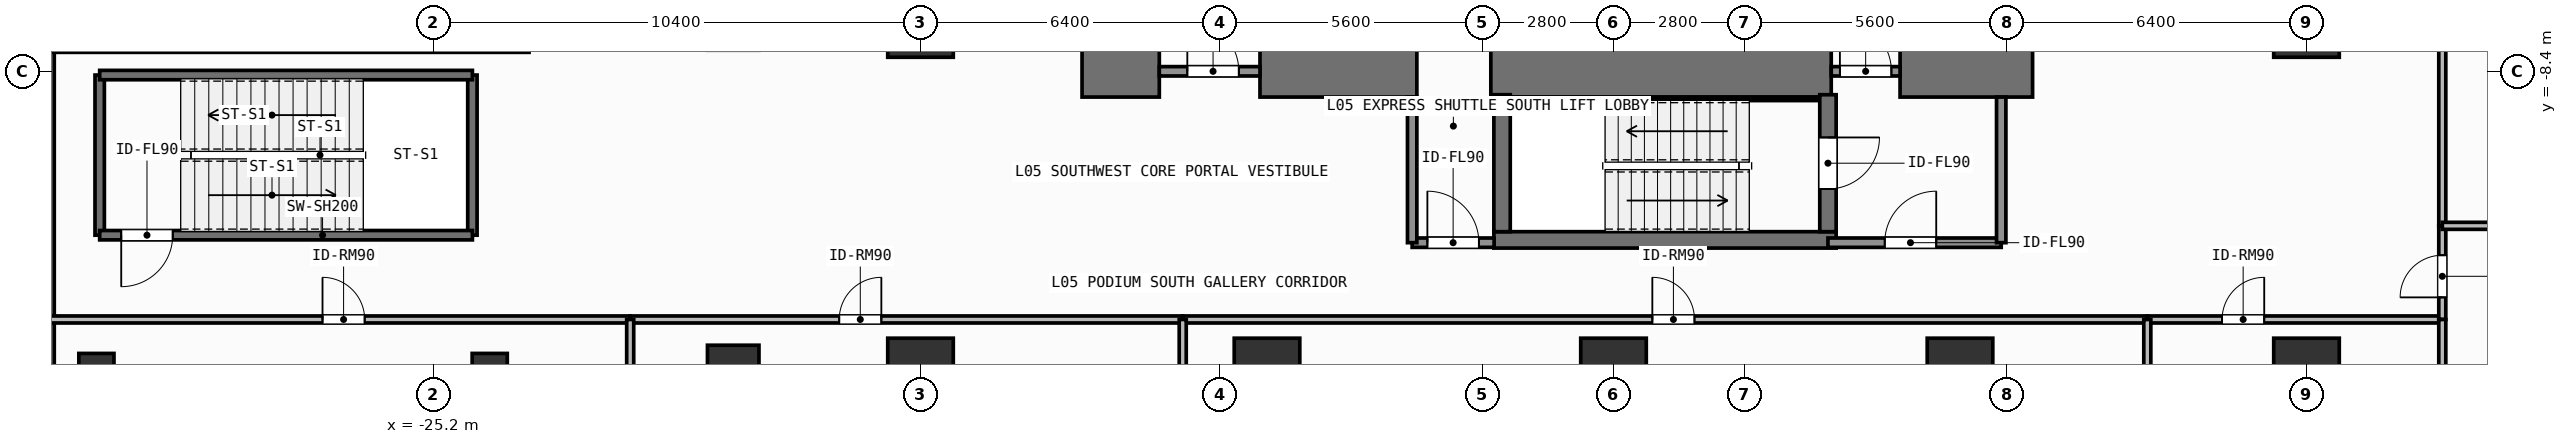
"""IFC4 building model, lengths in metres.
Left out: names, types, materials, properties, quantities, classifications, styles, units other than length and angle.
Written with IfcOpenShell. Run it as: python <this file> out.ifc"""

import sys

from ifc_helpers import new_model, si_unit, direction, frame, frame_2d, origin, origin_2d, place, context, subcontext, project, spatial, rectangle, extrude, element, fill, save


model = new_model("IFC4")
c1 = context("Model", 3, precision=1e-05, world=origin(), true_north=direction((0.0, 1.0)))
c2 = subcontext(c1, "Body", "Model", "MODEL_VIEW")
j1 = project(units=[si_unit("LENGTHUNIT", "METRE"), si_unit("PLANEANGLEUNIT", "RADIAN")], contexts=[c1])
p1 = place(None, origin())
s1 = spatial("IfcSite", under=j1, at=p1, CompositionType="ELEMENT")
p2 = place(p1, origin())
s2 = spatial("IfcBuilding", under=s1, at=p2, CompositionType="ELEMENT")
p3 = place(p2, frame((0.0, 0.0, 17.4)))
s3 = spatial("IfcBuildingStorey", under=s2, at=p3, CompositionType="ELEMENT", Elevation=17.4)
p4 = place(p3, frame((-11.35, -8.4, 0.0), z_axis=(0.0, 0.0, 1.0), x_axis=(1.0, 0.0, 0.0)))
e1 = element("IfcWall", 1, at=p4, inside=s3, PredefinedType="SHEAR", context=c2, shape_type="SweptSolid", body=[
    extrude(rectangle(XDim=1.65, YDim=1.1, at=frame_2d((0.825, 0.0))), origin(), (0.0, 0.0, 1.0), 4.2),
])
p5 = place(p3, frame((-7.55, -8.4, 0.0), z_axis=(0.0, 0.0, 1.0), x_axis=(1.0, 0.0, 0.0)))
e2 = element("IfcWall", 2, at=p5, inside=s3, PredefinedType="SHEAR", context=c2, shape_type="SweptSolid", body=[
    extrude(rectangle(XDim=3.35, YDim=1.1, at=frame_2d((1.675, 0.0))), origin(), (0.0, 0.0, 1.0), 4.2),
])
p6 = place(p3, frame((-2.62, -8.4, 0.0), z_axis=(0.0, 0.0, 1.0), x_axis=(1.0, 0.0, 0.0)))
e3 = element("IfcWall", 3, at=p6, inside=s3, PredefinedType="SHEAR", context=c2, shape_type="SweptSolid", body=[
    extrude(rectangle(XDim=7.27, YDim=1.1, at=frame_2d((3.635, 0.0))), origin(), (0.0, 0.0, 1.0), 4.2),
])
p7 = place(p3, frame((6.12, -8.4, 0.0), z_axis=(0.0, 0.0, 1.0), x_axis=(1.0, 0.0, 0.0)))
e4 = element("IfcWall", 4, at=p7, inside=s3, PredefinedType="SHEAR", context=c2, shape_type="SweptSolid", body=[
    extrude(rectangle(XDim=2.83, YDim=1.1, at=frame_2d((1.415, 0.0))), origin(), (0.0, 0.0, 1.0), 4.2),
])
p8 = place(p3, frame((-2.555, -12.0, 0.0), z_axis=(0.0, 0.0, 1.0), x_axis=(1.0, 0.0, 0.0)))
e5 = element("IfcWall", 5, at=p8, inside=s3, PredefinedType="SHEAR", context=c2, shape_type="SweptSolid", body=[
    extrude(rectangle(XDim=7.31, YDim=0.35, at=frame_2d((3.655, 0.0))), origin(), (0.0, 0.0, 1.0), 4.2),
])
p9 = place(p3, frame((-2.2, -8.988, 0.0), z_axis=(0.0, 0.0, 1.0), x_axis=(1.0, 0.0, 0.0)))
e6 = element("IfcWall", 6, at=p9, inside=s3, PredefinedType="SHEAR", context=c2, shape_type="SweptSolid", body=[
    extrude(rectangle(XDim=6.6, YDim=0.075, at=frame_2d((3.3, 0.0))), origin(), (0.0, 0.0, 1.0), 4.2),
])
p10 = place(p3, frame((-2.38, -11.825, 0.0), z_axis=(0.0, 0.0, 1.0), x_axis=(0.0, 1.0, 0.0)))
e7 = element("IfcWall", 7, at=p10, inside=s3, PredefinedType="SHEAR", context=c2, shape_type="SweptSolid", body=[
    extrude(rectangle(XDim=2.925, YDim=0.35, at=frame_2d((1.462, 0.0))), origin(), (0.0, 0.0, 1.0), 4.2),
])
p11 = place(p3, frame((4.58, -8.9, 0.0), z_axis=(0.0, 0.0, 1.0), x_axis=(0.0, -1.0, 0.0)))
e8 = element("IfcWall", 8, at=p11, inside=s3, PredefinedType="SHEAR", context=c2, shape_type="SweptSolid", body=[
    extrude(rectangle(XDim=2.925, YDim=0.35, at=frame_2d((1.462, 0.0))), origin(), (0.0, 0.0, 1.0), 4.2),
])
p12 = place(p11, frame((0.913, 0.0, 0.0)))
e9 = element("IfcOpeningElement", 9, at=p12, cuts=e8, PredefinedType="OPENING", context=c2, shape_type="SweptSolid", body=[
    extrude(rectangle(XDim=1.1, YDim=2.15, at=frame_2d((0.55, 1.075))), frame((0.0, 0.185, 0.0), z_axis=(0.0, -1.0, 0.0), x_axis=(1.0, 0.0, 0.0)), (0.0, 0.0, 1.0), 0.37),
])
for number, where, z_axis, x_axis in (
    (10, (-14.8, -14.8, 0.0), (0.0, 0.0, 1.0), (1.0, 0.0, 0.0)),
    (11, (-7.4, -14.8, 0.0), (0.0, 0.0, 1.0), (1.0, 0.0, 0.0)),
    (12, (0.0, -14.8, 0.0), (0.0, 0.0, 1.0), (1.0, 0.0, 0.0)),
    (13, (7.4, -14.8, 0.0), (0.0, 0.0, 1.0), (1.0, 0.0, 0.0)),
    (14, (14.8, -14.8, 0.0), (0.0, 0.0, 1.0), (1.0, 0.0, 0.0)),
    (15, (-14.8, -7.4, 0.0), (0.0, 0.0, 1.0), (1.0, 0.0, 0.0)),
    (16, (14.8, -7.4, 0.0), (0.0, 0.0, 1.0), (1.0, 0.0, 0.0)),
):
    element("IfcColumn", number, at=place(p3, frame(where, z_axis=z_axis, x_axis=x_axis)), inside=s3, PredefinedType="COLUMN", context=c2, shape_type="SweptSolid", body=[
        extrude(rectangle(XDim=1.4, YDim=1.4, at=origin_2d()), origin(), (0.0, 0.0, 1.0), 4.2),
    ])
p13 = place(p3, frame((-18.8, -14.8, 0.0), z_axis=(0.0, 0.0, 1.0), x_axis=(1.0, 0.0, 0.0)))
e17 = element("IfcColumn", 17, at=p13, inside=s3, PredefinedType="COLUMN", context=c2, shape_type="SweptSolid", body=[
    extrude(rectangle(XDim=1.1, YDim=1.1, at=origin_2d()), origin(), (0.0, 0.0, 1.0), 4.2),
])
for number, where, z_axis, x_axis in (
    (18, (-32.4, -14.8, 0.0), (0.0, 0.0, 1.0), (1.0, 0.0, 0.0)),
    (19, (-24.0, -14.8, 0.0), (0.0, 0.0, 1.0), (1.0, 0.0, 0.0)),
):
    element("IfcColumn", number, at=place(p3, frame(where, z_axis=z_axis, x_axis=x_axis)), inside=s3, PredefinedType="COLUMN", context=c2, shape_type="SweptSolid", body=[
        extrude(rectangle(XDim=0.75, YDim=0.75, at=origin_2d()), origin(), (0.0, 0.0, 1.0), 4.2),
    ])
p14 = place(p3, frame((-33.45, -20.5, 0.0), z_axis=(0.0, 0.0, 1.0), x_axis=(0.0, 1.0, 0.0)))
e20 = element("IfcWall", 20, at=p14, inside=s3, PredefinedType="SOLIDWALL", context=c2, shape_type="SweptSolid", body=[
    extrude(rectangle(XDim=14.09, YDim=0.3, at=frame_2d((7.045, 0.0))), origin(), (0.0, 0.0, 1.0), 3.96),
])
for number, where, z_axis, x_axis in (
    (21, (-32.33, -11.9, 0.0), (0.0, 0.0, 1.0), (0.0, 1.0, 0.0)),
    (22, (-24.37, -8.48, 0.0), (0.0, 0.0, 1.0), (0.0, -1.0, 0.0)),
):
    element("IfcWall", number, at=place(p3, frame(where, z_axis=z_axis, x_axis=x_axis)), inside=s3, PredefinedType="SHEAR", context=c2, shape_type="SweptSolid", body=[
        extrude(rectangle(XDim=3.42, YDim=0.2, at=frame_2d((1.71, 0.0))), origin(), (0.0, 0.0, 1.0), 3.96),
    ])
p15 = place(p3, frame((-24.37, -11.9, 0.0), z_axis=(0.0, 0.0, 1.0), x_axis=(-1.0, 0.0, 0.0)))
e23 = element("IfcWall", 23, at=p15, inside=s3, PredefinedType="SHEAR", context=c2, shape_type="SweptSolid", body=[
    extrude(rectangle(XDim=7.96, YDim=0.2, at=frame_2d((3.98, 0.0))), origin(), (0.0, 0.0, 1.0), 3.96),
])
p16 = place(p15, frame((6.4, 0.0, 0.0)))
e24 = element("IfcOpeningElement", 24, at=p16, cuts=e23, PredefinedType="OPENING", context=c2, shape_type="SweptSolid", body=[
    extrude(rectangle(XDim=1.1, YDim=2.15, at=frame_2d((0.55, 1.075))), frame((0.0, 0.11, 0.0), z_axis=(0.0, -1.0, 0.0), x_axis=(1.0, 0.0, 0.0)), (0.0, 0.0, 1.0), 0.22),
])
p17 = place(p3, frame((-32.33, -8.48, 0.0), z_axis=(0.0, 0.0, 1.0), x_axis=(1.0, 0.0, 0.0)))
e25 = element("IfcWall", 25, at=p17, inside=s3, PredefinedType="SHEAR", context=c2, shape_type="SweptSolid", body=[
    extrude(rectangle(XDim=7.96, YDim=0.2, at=frame_2d((3.98, 0.0))), origin(), (0.0, 0.0, 1.0), 3.96),
])
p18 = place(p3, frame((4.58, -12.06, 0.0), z_axis=(0.0, 0.0, 1.0), x_axis=(1.0, 0.0, 0.0)))
e26 = element("IfcWall", 26, at=p18, inside=s3, PredefinedType="SOLIDWALL", context=c2, shape_type="SweptSolid", body=[
    extrude(rectangle(XDim=3.7, YDim=0.2, at=frame_2d((1.85, 0.0))), origin(), (0.0, 0.0, 1.0), 3.96),
])
p19 = place(p18, frame((1.212, 0.0, 0.0)))
e27 = element("IfcOpeningElement", 27, at=p19, cuts=e26, PredefinedType="OPENING", context=c2, shape_type="SweptSolid", body=[
    extrude(rectangle(XDim=1.1, YDim=2.15, at=frame_2d((0.55, 1.075))), frame((0.0, 0.11, 0.0), z_axis=(0.0, -1.0, 0.0), x_axis=(1.0, 0.0, 0.0)), (0.0, 0.0, 1.0), 0.22),
])
p20 = place(p3, frame((4.65, -8.4, 0.0), z_axis=(0.0, 0.0, 1.0), x_axis=(1.0, 0.0, 0.0)))
e28 = element("IfcWall", 28, at=p20, inside=s3, PredefinedType="SOLIDWALL", context=c2, shape_type="SweptSolid", body=[
    extrude(rectangle(XDim=1.47, YDim=0.2, at=frame_2d((0.735, 0.0))), origin(), (0.0, 0.0, 1.0), 3.0),
])
p21 = place(p20, frame((0.185, 0.0, 0.0)))
e29 = element("IfcOpeningElement", 29, at=p21, cuts=e28, PredefinedType="OPENING", context=c2, shape_type="SweptSolid", body=[
    extrude(rectangle(XDim=1.1, YDim=2.15, at=frame_2d((0.55, 1.075))), frame((0.0, 0.11, 0.0), z_axis=(0.0, -1.0, 0.0), x_axis=(1.0, 0.0, 0.0)), (0.0, 0.0, 1.0), 0.22),
])
p22 = place(p3, frame((-9.7, -8.4, 0.0), z_axis=(0.0, 0.0, 1.0), x_axis=(1.0, 0.0, 0.0)))
e30 = element("IfcWall", 30, at=p22, inside=s3, PredefinedType="SOLIDWALL", context=c2, shape_type="SweptSolid", body=[
    extrude(rectangle(XDim=2.15, YDim=0.2, at=frame_2d((1.075, 0.0))), origin(), (0.0, 0.0, 1.0), 3.0),
])
p23 = place(p22, frame((0.598, 0.0, 0.0)))
e31 = element("IfcOpeningElement", 31, at=p23, cuts=e30, PredefinedType="OPENING", context=c2, shape_type="SweptSolid", body=[
    extrude(rectangle(XDim=1.1, YDim=2.15, at=frame_2d((0.55, 1.075))), frame((0.0, 0.11, 0.0), z_axis=(0.0, -1.0, 0.0), x_axis=(1.0, 0.0, 0.0)), (0.0, 0.0, 1.0), 0.22),
])
p24 = place(p3, frame((-4.3, -12.06, 0.0), z_axis=(0.0, 0.0, 1.0), x_axis=(1.0, 0.0, 0.0)))
e32 = element("IfcWall", 32, at=p24, inside=s3, PredefinedType="SOLIDWALL", context=c2, shape_type="SweptSolid", body=[
    extrude(rectangle(XDim=1.75, YDim=0.2, at=frame_2d((0.875, 0.0))), origin(), (0.0, 0.0, 1.0), 3.96),
])
p25 = place(p24, frame((0.325, 0.0, 0.0)))
e33 = element("IfcOpeningElement", 33, at=p25, cuts=e32, PredefinedType="OPENING", context=c2, shape_type="SweptSolid", body=[
    extrude(rectangle(XDim=1.1, YDim=2.15, at=frame_2d((0.55, 1.075))), frame((0.0, 0.11, 0.0), z_axis=(0.0, -1.0, 0.0), x_axis=(1.0, 0.0, 0.0)), (0.0, 0.0, 1.0), 0.22),
])
p26 = place(p3, frame((17.7, -11.7, 0.0), z_axis=(0.0, 0.0, 1.0), x_axis=(0.0, 1.0, 0.0)))
e34 = element("IfcWall", 34, at=p26, inside=s3, PredefinedType="PARTITIONING", context=c2, shape_type="SweptSolid", body=[
    extrude(rectangle(XDim=16.98, YDim=0.15, at=frame_2d((8.49, 0.0))), origin(), (0.0, 0.0, 1.0), 3.96),
])
p27 = place(p26, frame((7.69, 0.0, 0.0)))
e35 = element("IfcOpeningElement", 35, at=p27, cuts=e34, PredefinedType="OPENING", context=c2, shape_type="SweptSolid", body=[
    extrude(rectangle(XDim=1.6, YDim=2.3, at=frame_2d((0.8, 1.15))), frame((0.0, 0.085, 0.0), z_axis=(0.0, -1.0, 0.0), x_axis=(1.0, 0.0, 0.0)), (0.0, 0.0, 1.0), 0.17),
])
p28 = place(p3, frame((-33.42, -13.7, 0.0), z_axis=(0.0, 0.0, 1.0), x_axis=(1.0, 0.0, 0.0)))
e36 = element("IfcWall", 36, at=p28, inside=s3, PredefinedType="PARTITIONING", context=c2, shape_type="SweptSolid", body=[
    extrude(rectangle(XDim=12.42, YDim=0.15, at=frame_2d((6.21, 0.0))), origin(), (0.0, 0.0, 1.0), 3.96),
])
p29 = place(p28, frame((5.849, 0.0, 0.0)))
e37 = element("IfcOpeningElement", 37, at=p29, cuts=e36, PredefinedType="OPENING", context=c2, shape_type="SweptSolid", body=[
    extrude(rectangle(XDim=0.9, YDim=2.1, at=frame_2d((0.45, 1.05))), frame((0.0, 0.085, 0.0), z_axis=(0.0, -1.0, 0.0), x_axis=(1.0, 0.0, 0.0)), (0.0, 0.0, 1.0), 0.17),
])
p30 = place(p3, frame((-21.0, -13.7, 0.0), z_axis=(0.0, 0.0, 1.0), x_axis=(1.0, 0.0, 0.0)))
e38 = element("IfcWall", 38, at=p30, inside=s3, PredefinedType="PARTITIONING", context=c2, shape_type="SweptSolid", body=[
    extrude(rectangle(XDim=11.8, YDim=0.15, at=frame_2d((5.9, 0.0))), origin(), (0.0, 0.0, 1.0), 3.96),
])
p31 = place(p30, frame((4.464, 0.0, 0.0)))
e39 = element("IfcOpeningElement", 39, at=p31, cuts=e38, PredefinedType="OPENING", context=c2, shape_type="SweptSolid", body=[
    extrude(rectangle(XDim=0.9, YDim=2.1, at=frame_2d((0.45, 1.05))), frame((0.0, 0.085, 0.0), z_axis=(0.0, -1.0, 0.0), x_axis=(1.0, 0.0, 0.0)), (0.0, 0.0, 1.0), 0.17),
])
p32 = place(p3, frame((-9.2, -13.7, 0.0), z_axis=(0.0, 0.0, 1.0), x_axis=(1.0, 0.0, 0.0)))
e40 = element("IfcWall", 40, at=p32, inside=s3, PredefinedType="PARTITIONING", context=c2, shape_type="SweptSolid", body=[
    extrude(rectangle(XDim=20.6, YDim=0.15, at=frame_2d((10.3, 0.0))), origin(), (0.0, 0.0, 1.0), 3.96),
])
p33 = place(p32, frame((10.029, 0.0, 0.0)))
e41 = element("IfcOpeningElement", 41, at=p33, cuts=e40, PredefinedType="OPENING", context=c2, shape_type="SweptSolid", body=[
    extrude(rectangle(XDim=0.9, YDim=2.1, at=frame_2d((0.45, 1.05))), frame((0.0, 0.085, 0.0), z_axis=(0.0, -1.0, 0.0), x_axis=(1.0, 0.0, 0.0)), (0.0, 0.0, 1.0), 0.17),
])
p34 = place(p3, frame((11.4, -13.7, 0.0), z_axis=(0.0, 0.0, 1.0), x_axis=(1.0, 0.0, 0.0)))
e42 = element("IfcWall", 42, at=p34, inside=s3, PredefinedType="PARTITIONING", context=c2, shape_type="SweptSolid", body=[
    extrude(rectangle(XDim=6.25, YDim=0.15, at=frame_2d((3.125, 0.0))), origin(), (0.0, 0.0, 1.0), 3.96),
])
p35 = place(p34, frame((1.597, 0.0, 0.0)))
e43 = element("IfcOpeningElement", 43, at=p35, cuts=e42, PredefinedType="OPENING", context=c2, shape_type="SweptSolid", body=[
    extrude(rectangle(XDim=0.9, YDim=2.1, at=frame_2d((0.45, 1.05))), frame((0.0, 0.085, 0.0), z_axis=(0.0, -1.0, 0.0), x_axis=(1.0, 0.0, 0.0)), (0.0, 0.0, 1.0), 0.17),
])
p36 = place(p3, frame((17.7, -13.7, 0.0), z_axis=(0.0, 0.0, 1.0), x_axis=(0.0, 1.0, 0.0)))
e44 = element("IfcWall", 44, at=p36, inside=s3, PredefinedType="PARTITIONING", context=c2, shape_type="SweptSolid", body=[
    extrude(rectangle(XDim=2.0, YDim=0.15, at=frame_2d((1.0, 0.0))), origin(), (0.0, 0.0, 1.0), 3.96),
])
p37 = place(p36, frame((0.472, 0.0, 0.0)))
e45 = element("IfcOpeningElement", 45, at=p37, cuts=e44, PredefinedType="OPENING", context=c2, shape_type="SweptSolid", body=[
    extrude(rectangle(XDim=0.9, YDim=2.1, at=frame_2d((0.45, 1.05))), frame((0.0, 0.085, 0.0), z_axis=(0.0, -1.0, 0.0), x_axis=(1.0, 0.0, 0.0)), (0.0, 0.0, 1.0), 0.17),
])
for number, where, z_axis, x_axis in (
    (46, (8.28, -12.06, 0.0), (0.0, 0.0, 1.0), (0.0, 1.0, 0.0)),
    (47, (-4.3, -12.06, 0.0), (0.0, 0.0, 1.0), (0.0, 1.0, 0.0)),
):
    element("IfcWall", number, at=place(p3, frame(where, z_axis=z_axis, x_axis=x_axis)), inside=s3, PredefinedType="SOLIDWALL", context=c2, shape_type="SweptSolid", body=[
        extrude(rectangle(XDim=3.11, YDim=0.2, at=frame_2d((1.555, 0.0))), origin(), (0.0, 0.0, 1.0), 3.96),
    ])
p38 = place(p3, frame((-33.42, -7.92, 0.0), z_axis=(0.0, 0.0, 1.0), x_axis=(1.0, 0.0, 0.0)))
e48 = element("IfcWall", 48, at=p38, inside=s3, PredefinedType="PARTITIONING", context=c2, shape_type="SweptSolid", body=[
    extrude(rectangle(XDim=10.26, YDim=0.15, at=frame_2d((5.13, 0.0))), origin(), (0.0, 0.0, 1.0), 3.96),
])
p39 = place(p3, frame((17.7, -11.7, 0.0), z_axis=(0.0, 0.0, 1.0), x_axis=(1.0, 0.0, 0.0)))
e49 = element("IfcWall", 49, at=p39, inside=s3, PredefinedType="PARTITIONING", context=c2, shape_type="SweptSolid", body=[
    extrude(rectangle(XDim=15.72, YDim=0.15, at=frame_2d((7.86, 0.0))), origin(), (0.0, 0.0, 1.0), 3.96),
])
for number, where, z_axis, x_axis in (
    (50, (-21.0, -24.92, 0.0), (0.0, 0.0, 1.0), (0.0, 1.0, 0.0)),
    (51, (-9.2, -24.92, 0.0), (0.0, 0.0, 1.0), (0.0, 1.0, 0.0)),
    (52, (11.4, -24.92, 0.0), (0.0, 0.0, 1.0), (0.0, 1.0, 0.0)),
    (53, (17.7, -24.92, 0.0), (0.0, 0.0, 1.0), (0.0, 1.0, 0.0)),
):
    element("IfcWall", number, at=place(p3, frame(where, z_axis=z_axis, x_axis=x_axis)), inside=s3, PredefinedType="PARTITIONING", context=c2, shape_type="SweptSolid", body=[
        extrude(rectangle(XDim=11.22, YDim=0.15, at=frame_2d((5.61, 0.0))), origin(), (0.0, 0.0, 1.0), 3.96),
    ])
p40 = place(p12, origin())
e54 = element("IfcDoor", 54, at=p40, inside=s3, OperationType="SINGLE_SWING_LEFT", PredefinedType="DOOR", context=c2, shape_type="SweptSolid", body=[
    extrude(rectangle(XDim=1.1, YDim=2.15, at=frame_2d((0.55, 1.075))), frame((0.0, 0.025, 0.0), z_axis=(0.0, -1.0, 0.0), x_axis=(1.0, 0.0, 0.0)), (0.0, 0.0, 1.0), 0.05),
])
fill(e9, e54)
p41 = place(p16, origin())
e55 = element("IfcDoor", 55, at=p41, inside=s3, OperationType="SINGLE_SWING_RIGHT", PredefinedType="DOOR", context=c2, shape_type="SweptSolid", body=[
    extrude(rectangle(XDim=1.1, YDim=2.15, at=frame_2d((0.55, 1.075))), frame((0.0, 0.025, 0.0), z_axis=(0.0, -1.0, 0.0), x_axis=(1.0, 0.0, 0.0)), (0.0, 0.0, 1.0), 0.05),
])
fill(e24, e55)
p42 = place(p19, origin())
e56 = element("IfcDoor", 56, at=p42, inside=s3, OperationType="SINGLE_SWING_RIGHT", PredefinedType="DOOR", context=c2, shape_type="SweptSolid", body=[
    extrude(rectangle(XDim=1.1, YDim=2.15, at=frame_2d((0.55, 1.075))), frame((0.0, 0.025, 0.0), z_axis=(0.0, -1.0, 0.0), x_axis=(1.0, 0.0, 0.0)), (0.0, 0.0, 1.0), 0.05),
])
fill(e27, e56)
p43 = place(p21, origin())
e57 = element("IfcDoor", 57, at=p43, inside=s3, OperationType="SINGLE_SWING_LEFT", PredefinedType="DOOR", context=c2, shape_type="SweptSolid", body=[
    extrude(rectangle(XDim=1.1, YDim=2.15, at=frame_2d((0.55, 1.075))), frame((0.0, 0.025, 0.0), z_axis=(0.0, -1.0, 0.0), x_axis=(1.0, 0.0, 0.0)), (0.0, 0.0, 1.0), 0.05),
])
fill(e29, e57)
p44 = place(p23, origin())
e58 = element("IfcDoor", 58, at=p44, inside=s3, OperationType="SINGLE_SWING_LEFT", PredefinedType="DOOR", context=c2, shape_type="SweptSolid", body=[
    extrude(rectangle(XDim=1.1, YDim=2.15, at=frame_2d((0.55, 1.075))), frame((0.0, 0.025, 0.0), z_axis=(0.0, -1.0, 0.0), x_axis=(1.0, 0.0, 0.0)), (0.0, 0.0, 1.0), 0.05),
])
fill(e31, e58)
p45 = place(p25, origin())
e59 = element("IfcDoor", 59, at=p45, inside=s3, OperationType="SINGLE_SWING_LEFT", PredefinedType="DOOR", context=c2, shape_type="SweptSolid", body=[
    extrude(rectangle(XDim=1.1, YDim=2.15, at=frame_2d((0.55, 1.075))), frame((0.0, 0.025, 0.0), z_axis=(0.0, -1.0, 0.0), x_axis=(1.0, 0.0, 0.0)), (0.0, 0.0, 1.0), 0.05),
])
fill(e33, e59)
p46 = place(p29, origin())
e60 = element("IfcDoor", 60, at=p46, inside=s3, OperationType="SINGLE_SWING_LEFT", PredefinedType="DOOR", context=c2, shape_type="SweptSolid", body=[
    extrude(rectangle(XDim=0.9, YDim=2.1, at=frame_2d((0.45, 1.05))), frame((0.0, 0.025, 0.0), z_axis=(0.0, -1.0, 0.0), x_axis=(1.0, 0.0, 0.0)), (0.0, 0.0, 1.0), 0.05),
])
fill(e37, e60)
p47 = place(p31, origin())
e61 = element("IfcDoor", 61, at=p47, inside=s3, OperationType="SINGLE_SWING_RIGHT", PredefinedType="DOOR", context=c2, shape_type="SweptSolid", body=[
    extrude(rectangle(XDim=0.9, YDim=2.1, at=frame_2d((0.45, 1.05))), frame((0.0, 0.025, 0.0), z_axis=(0.0, -1.0, 0.0), x_axis=(1.0, 0.0, 0.0)), (0.0, 0.0, 1.0), 0.05),
])
fill(e39, e61)
p48 = place(p33, origin())
e62 = element("IfcDoor", 62, at=p48, inside=s3, OperationType="SINGLE_SWING_LEFT", PredefinedType="DOOR", context=c2, shape_type="SweptSolid", body=[
    extrude(rectangle(XDim=0.9, YDim=2.1, at=frame_2d((0.45, 1.05))), frame((0.0, 0.025, 0.0), z_axis=(0.0, -1.0, 0.0), x_axis=(1.0, 0.0, 0.0)), (0.0, 0.0, 1.0), 0.05),
])
fill(e41, e62)
p49 = place(p35, origin())
e63 = element("IfcDoor", 63, at=p49, inside=s3, OperationType="SINGLE_SWING_RIGHT", PredefinedType="DOOR", context=c2, shape_type="SweptSolid", body=[
    extrude(rectangle(XDim=0.9, YDim=2.1, at=frame_2d((0.45, 1.05))), frame((0.0, 0.025, 0.0), z_axis=(0.0, -1.0, 0.0), x_axis=(1.0, 0.0, 0.0)), (0.0, 0.0, 1.0), 0.05),
])
fill(e43, e63)
p50 = place(p37, origin())
e64 = element("IfcDoor", 64, at=p50, inside=s3, OperationType="SINGLE_SWING_LEFT", PredefinedType="DOOR", context=c2, shape_type="SweptSolid", body=[
    extrude(rectangle(XDim=0.9, YDim=2.1, at=frame_2d((0.45, 1.05))), frame((0.0, 0.025, 0.0), z_axis=(0.0, -1.0, 0.0), x_axis=(1.0, 0.0, 0.0)), (0.0, 0.0, 1.0), 0.05),
])
fill(e45, e64)
save(model, sys.argv[1])
